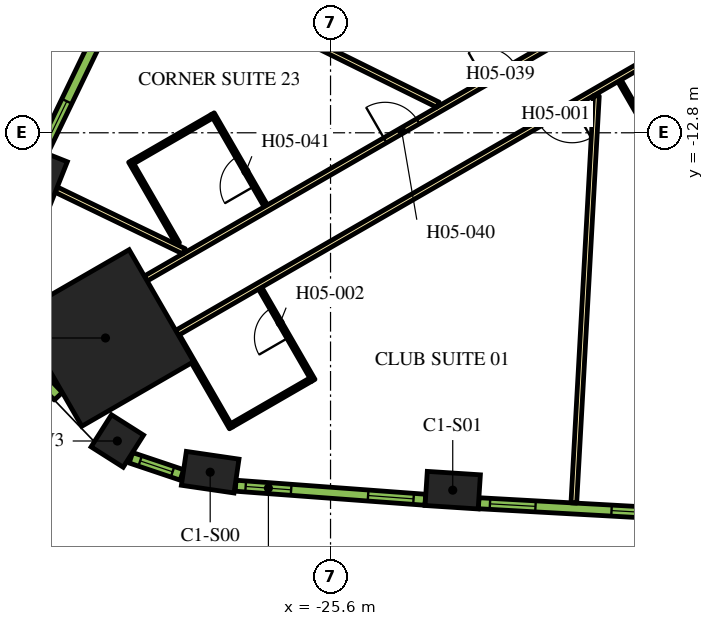
"""IFC4 building model, lengths in metres.
Left out: names, types, materials, properties, quantities, classifications, styles, units other than length and angle.
Written with IfcOpenShell. Run it as: python <this file> out.ifc"""

import sys

from ifc_helpers import new_model, si_unit, direction, frame, frame_2d, origin, origin_2d, place, context, subcontext, project, spatial, rectangle, extrude, element, fill, save


model = new_model("IFC4")
c1 = context("Model", 3, precision=1e-05, world=origin(), true_north=direction((0.0, 1.0)))
c2 = subcontext(c1, "Body", "Model", "MODEL_VIEW")
j1 = project(units=[si_unit("LENGTHUNIT", "METRE"), si_unit("PLANEANGLEUNIT", "RADIAN")], contexts=[c1])
p1 = place(None, origin())
s1 = spatial("IfcSite", under=j1, at=p1, CompositionType="ELEMENT")
p2 = place(p1, origin())
s2 = spatial("IfcBuilding", under=s1, at=p2, CompositionType="ELEMENT")
p3 = place(p2, frame((0.0, 0.0, 74.4)))
s3 = spatial("IfcBuildingStorey", under=s2, at=p3, CompositionType="ELEMENT", Elevation=74.4)
p4 = place(p3, frame((-31.522, -18.199, 0.0), z_axis=(0.0, 0.0, 1.0), x_axis=(-0.866025403784, -0.5, 0.0)))
e1 = element("IfcColumn", 1, at=p4, inside=s3, PredefinedType="COLUMN", context=c2, shape_type="SweptSolid", body=[
    extrude(rectangle(XDim=3.4, YDim=3.4, at=origin_2d()), origin(), (0.0, 0.0, 1.0), 3.9),
])
for number, where, z_axis, x_axis in (
    (2, (-28.767, -21.731, 0.0), (0.0, 0.0, 1.0), (0.989, -0.145, 0.0)),
    (3, (-22.385, -22.204, 0.0), (0.0, 0.0, 1.0), (0.998, -0.065, 0.0)),
    (4, (-33.203, -14.047, 0.0), (0.0, 0.0, 1.0), (-0.369, -0.929, 0.0)),
):
    element("IfcColumn", number, at=place(p3, frame(where, z_axis=z_axis, x_axis=x_axis)), inside=s3, PredefinedType="COLUMN", context=c2, shape_type="SweptSolid", body=[
        extrude(rectangle(XDim=1.4, YDim=0.9, at=origin_2d()), origin(), (0.0, 0.0, 1.0), 3.9),
    ])
p5 = place(p3, frame((-31.21, -20.91, 0.0), z_axis=(0.0, 0.0, 1.0), x_axis=(0.844485001826, -0.535579202071, 0.0)))
e5 = element("IfcColumn", 5, at=p5, inside=s3, PredefinedType="COLUMN", context=c2, shape_type="SweptSolid", body=[
    extrude(rectangle(XDim=1.0, YDim=1.0, at=origin_2d()), origin(), (0.0, 0.0, 1.0), 3.9),
])
p6 = place(p3, frame((-30.463, -16.635, 0.0), z_axis=(0.0, 0.0, 1.0), x_axis=(0.866022394896, 0.500005211512, 0.0)))
e6 = element("IfcWall", 6, at=p6, inside=s3, PredefinedType="PARTITIONING", context=c2, shape_type="SweptSolid", body=[
    extrude(rectangle(XDim=16.144, YDim=0.15, at=frame_2d((8.072, 0.0))), origin(), (0.0, 0.0, 1.0), 2.7),
])
p7 = place(p6, frame((13.948, 0.0, 0.0)))
e7 = element("IfcOpeningElement", 7, at=p7, cuts=e6, PredefinedType="OPENING", context=c2, shape_type="SweptSolid", body=[
    extrude(rectangle(XDim=0.9, YDim=2.1, at=frame_2d((0.45, 1.05))), frame((0.0, 0.085, 0.0), z_axis=(0.0, -1.0, 0.0), x_axis=(1.0, 0.0, 0.0)), (0.0, 0.0, 1.0), 0.17),
])
p8 = place(p6, frame((10.329, 0.0, 0.0)))
e8 = element("IfcOpeningElement", 8, at=p8, cuts=e6, PredefinedType="OPENING", context=c2, shape_type="SweptSolid", body=[
    extrude(rectangle(XDim=0.9, YDim=2.1, at=frame_2d((0.45, 1.05))), frame((0.0, 0.085, 0.0), z_axis=(0.0, -1.0, 0.0), x_axis=(1.0, 0.0, 0.0)), (0.0, 0.0, 1.0), 0.17),
])
p9 = place(p6, frame((7.275, 0.0, 0.0)))
e9 = element("IfcOpeningElement", 9, at=p9, cuts=e6, PredefinedType="OPENING", context=c2, shape_type="SweptSolid", body=[
    extrude(rectangle(XDim=1.0, YDim=2.1, at=frame_2d((0.5, 1.05))), frame((0.0, 0.085, 0.0), z_axis=(0.0, -1.0, 0.0), x_axis=(1.0, 0.0, 0.0)), (0.0, 0.0, 1.0), 0.17),
])
p10 = place(p3, frame((-15.587, -9.952, 0.0), z_axis=(0.0, 0.0, 1.0), x_axis=(-0.866022197818, -0.500005552856, 0.0)))
e10 = element("IfcWall", 10, at=p10, inside=s3, PredefinedType="PARTITIONING", context=c2, shape_type="SweptSolid", body=[
    extrude(rectangle(XDim=16.224, YDim=0.15, at=frame_2d((8.112, 0.0))), origin(), (0.0, 0.0, 1.0), 2.7),
])
p11 = place(p10, frame((4.22, 0.0, 0.0)))
e11 = element("IfcOpeningElement", 11, at=p11, cuts=e10, PredefinedType="OPENING", context=c2, shape_type="SweptSolid", body=[
    extrude(rectangle(XDim=1.0, YDim=2.1, at=frame_2d((0.5, 1.05))), frame((0.0, 0.085, 0.0), z_axis=(0.0, -1.0, 0.0), x_axis=(1.0, 0.0, 0.0)), (0.0, 0.0, 1.0), 0.17),
])
p12 = place(p3, frame((-32.817, -14.296, 0.0), z_axis=(0.0, 0.0, 1.0), x_axis=(0.900616957918, -0.434613730927, 0.0)))
e12 = element("IfcWall", 12, at=p12, inside=s3, PredefinedType="PARTITIONING", context=c2, shape_type="SweptSolid", body=[
    extrude(rectangle(XDim=3.733, YDim=0.15, at=frame_2d((1.867, 0.0))), origin(), (0.0, 0.0, 1.0), 2.7),
])
p13 = place(p3, frame((-30.018, -8.483, 0.0), z_axis=(0.0, 0.0, 1.0), x_axis=(0.896544505264, -0.44295366584, 0.0)))
e13 = element("IfcWall", 13, at=p13, inside=s3, PredefinedType="PARTITIONING", context=c2, shape_type="SweptSolid", body=[
    extrude(rectangle(XDim=8.079, YDim=0.15, at=frame_2d((4.04, 0.0))), origin(), (0.0, 0.0, 1.0), 2.7),
])
p14 = place(p3, frame((-19.198, -22.541, 0.0), z_axis=(0.0, 0.0, 1.0), x_axis=(0.055432210572, 0.99846245299, 0.0)))
e14 = element("IfcWall", 14, at=p14, inside=s3, PredefinedType="PARTITIONING", context=c2, shape_type="SweptSolid", body=[
    extrude(rectangle(XDim=10.729, YDim=0.15, at=frame_2d((5.365, 0.0))), origin(), (0.0, 0.0, 1.0), 2.7),
])
p15 = place(p3, frame((-26.052, -19.314, 0.0), z_axis=(0.0, 0.0, 1.0), x_axis=(-0.49998411664, 0.866034573852, 0.0)))
e15 = element("IfcWall", 15, at=p15, inside=s3, PredefinedType="PARTITIONING", context=c2, shape_type="SweptSolid", body=[
    extrude(rectangle(XDim=2.8, YDim=0.1, at=frame_2d((1.4, 0.0))), origin(), (0.0, 0.0, 1.0), 2.7),
])
p16 = place(p15, frame((1.3, 0.0, 0.0)))
e16 = element("IfcOpeningElement", 16, at=p16, cuts=e15, PredefinedType="OPENING", context=c2, shape_type="SweptSolid", body=[
    extrude(rectangle(XDim=0.9, YDim=2.1, at=frame_2d((0.45, 1.05))), frame((0.0, 0.06, 0.0), z_axis=(0.0, -1.0, 0.0), x_axis=(1.0, 0.0, 0.0)), (0.0, 0.0, 1.0), 0.12),
])
p17 = place(p3, frame((-26.121, -19.295, 0.0), z_axis=(0.0, 0.0, 1.0), x_axis=(-0.866006032174, -0.500033551112, 0.0)))
e17 = element("IfcWall", 17, at=p17, inside=s3, PredefinedType="PARTITIONING", context=c2, shape_type="SweptSolid", body=[
    extrude(rectangle(XDim=2.4, YDim=0.1, at=frame_2d((1.2, 0.0))), origin(), (0.0, 0.0, 1.0), 2.7),
])
p18 = place(p3, frame((-29.617, -18.139, 0.0), z_axis=(0.0, 0.0, 1.0), x_axis=(0.49998411664, -0.866034573852, 0.0)))
e18 = element("IfcWall", 18, at=p18, inside=s3, PredefinedType="PARTITIONING", context=c2, shape_type="SweptSolid", body=[
    extrude(rectangle(XDim=2.8, YDim=0.1, at=frame_2d((1.4, 0.0))), origin(), (0.0, 0.0, 1.0), 2.7),
])
p19 = place(p3, frame((-16.779, -13.538, 0.0), z_axis=(0.0, 0.0, 1.0), x_axis=(-0.500061642096, 0.865989811779, 0.0)))
e19 = element("IfcWall", 19, at=p19, inside=s3, PredefinedType="PARTITIONING", context=c2, shape_type="SweptSolid", body=[
    extrude(rectangle(XDim=2.43, YDim=0.1, at=frame_2d((1.215, 0.0))), origin(), (0.0, 0.0, 1.0), 2.7),
])
p20 = place(p3, frame((-27.304, -14.725, 0.0), z_axis=(0.0, 0.0, 1.0), x_axis=(-0.49998411664, 0.866034573852, 0.0)))
e20 = element("IfcWall", 20, at=p20, inside=s3, PredefinedType="PARTITIONING", context=c2, shape_type="SweptSolid", body=[
    extrude(rectangle(XDim=2.8, YDim=0.1, at=frame_2d((1.4, 0.0))), origin(), (0.0, 0.0, 1.0), 2.7),
])
p21 = place(p20, frame((0.6, 0.0, 0.0)))
e21 = element("IfcOpeningElement", 21, at=p21, cuts=e20, PredefinedType="OPENING", context=c2, shape_type="SweptSolid", body=[
    extrude(rectangle(XDim=0.9, YDim=2.1, at=frame_2d((0.45, 1.05))), frame((0.0, 0.06, 0.0), z_axis=(0.0, -1.0, 0.0), x_axis=(1.0, 0.0, 0.0)), (0.0, 0.0, 1.0), 0.12),
])
p22 = place(p3, frame((-28.722, -12.368, 0.0), z_axis=(0.0, 0.0, 1.0), x_axis=(-0.866050077142, -0.499957262057, 0.0)))
e22 = element("IfcWall", 22, at=p22, inside=s3, PredefinedType="PARTITIONING", context=c2, shape_type="SweptSolid", body=[
    extrude(rectangle(XDim=2.4, YDim=0.1, at=frame_2d((1.2, 0.0))), origin(), (0.0, 0.0, 1.0), 2.7),
])
p23 = place(p3, frame((-29.619, -15.715, 0.0), z_axis=(0.0, 0.0, 1.0), x_axis=(-0.500004234368, 0.866022959057, 0.0)))
e23 = element("IfcWall", 23, at=p23, inside=s3, PredefinedType="PARTITIONING", context=c2, shape_type="SweptSolid", body=[
    extrude(rectangle(XDim=2.5, YDim=0.1, at=frame_2d((1.25, 0.0))), origin(), (0.0, 0.0, 1.0), 2.7),
])
p24 = place(p3, frame((-28.098, -22.086, 0.0), z_axis=(0.0, 0.0, 1.0), x_axis=(0.997266290399, -0.073891447643, 0.0)))
e24 = element("IfcWall", 24, at=p24, inside=s3, PredefinedType="SOLIDWALL", context=c2, shape_type="SweptSolid", body=[
    extrude(rectangle(XDim=5.006, YDim=0.29, at=frame_2d((2.503, 0.0))), origin(), (0.0, 0.0, 1.0), 3.6),
])
p25 = place(p24, frame((0.265, 0.0, 0.9)))
e25 = element("IfcOpeningElement", 25, at=p25, cuts=e24, PredefinedType="OPENING", context=c2, shape_type="SweptSolid", body=[
    extrude(rectangle(XDim=1.2, YDim=2.15, at=frame_2d((0.6, 1.075))), frame((0.0, 0.155, 0.0), z_axis=(0.0, -1.0, 0.0), x_axis=(1.0, 0.0, 0.0)), (0.0, 0.0, 1.0), 0.31),
])
p26 = place(p24, frame((3.496, 0.0, 0.9)))
e26 = element("IfcOpeningElement", 26, at=p26, cuts=e24, PredefinedType="OPENING", context=c2, shape_type="SweptSolid", body=[
    extrude(rectangle(XDim=1.2, YDim=2.15, at=frame_2d((0.6, 1.075))), frame((0.0, 0.155, 0.0), z_axis=(0.0, -1.0, 0.0), x_axis=(1.0, 0.0, 0.0)), (0.0, 0.0, 1.0), 0.31),
])
p27 = place(p3, frame((-21.701, -22.547, 0.0), z_axis=(0.0, 0.0, 1.0), x_axis=(0.998464708705, -0.055391564976, 0.0)))
e27 = element("IfcWall", 27, at=p27, inside=s3, PredefinedType="SOLIDWALL", context=c2, shape_type="SweptSolid", body=[
    extrude(rectangle(XDim=4.998, YDim=0.29, at=frame_2d((2.499, 0.0))), origin(), (0.0, 0.0, 1.0), 3.6),
])
p28 = place(p27, frame((0.297, 0.0, 0.9)))
e28 = element("IfcOpeningElement", 28, at=p28, cuts=e27, PredefinedType="OPENING", context=c2, shape_type="SweptSolid", body=[
    extrude(rectangle(XDim=1.2, YDim=2.15, at=frame_2d((0.6, 1.075))), frame((0.0, 0.155, 0.0), z_axis=(0.0, -1.0, 0.0), x_axis=(1.0, 0.0, 0.0)), (0.0, 0.0, 1.0), 0.31),
])
p29 = place(p27, frame((3.501, 0.0, 0.9)))
e29 = element("IfcOpeningElement", 29, at=p29, cuts=e27, PredefinedType="OPENING", context=c2, shape_type="SweptSolid", body=[
    extrude(rectangle(XDim=1.2, YDim=2.15, at=frame_2d((0.6, 1.075))), frame((0.0, 0.155, 0.0), z_axis=(0.0, -1.0, 0.0), x_axis=(1.0, 0.0, 0.0)), (0.0, 0.0, 1.0), 0.31),
])
p30 = place(p3, frame((-31.0, -8.782, 0.0), z_axis=(0.0, 0.0, 1.0), x_axis=(-0.434664499056, -0.900592456808, 0.0)))
e30 = element("IfcWall", 30, at=p30, inside=s3, PredefinedType="SOLIDWALL", context=c2, shape_type="SweptSolid", body=[
    extrude(rectangle(XDim=5.006, YDim=0.29, at=frame_2d((2.503, 0.0))), origin(), (0.0, 0.0, 1.0), 3.6),
])
p31 = place(p30, frame((0.31, 0.0, 0.9)))
e31 = element("IfcOpeningElement", 31, at=p31, cuts=e30, PredefinedType="OPENING", context=c2, shape_type="SweptSolid", body=[
    extrude(rectangle(XDim=1.2, YDim=2.15, at=frame_2d((0.6, 1.075))), frame((0.0, 0.155, 0.0), z_axis=(0.0, -1.0, 0.0), x_axis=(1.0, 0.0, 0.0)), (0.0, 0.0, 1.0), 0.31),
])
p32 = place(p30, frame((3.541, 0.0, 0.9)))
e32 = element("IfcOpeningElement", 32, at=p32, cuts=e30, PredefinedType="OPENING", context=c2, shape_type="SweptSolid", body=[
    extrude(rectangle(XDim=1.2, YDim=2.15, at=frame_2d((0.6, 1.075))), frame((0.0, 0.155, 0.0), z_axis=(0.0, -1.0, 0.0), x_axis=(1.0, 0.0, 0.0)), (0.0, 0.0, 1.0), 0.31),
])
p33 = place(p3, frame((-33.291, -19.181, 0.0), z_axis=(0.0, 0.0, 1.0), x_axis=(0.692252359589, -0.721655506903, 0.0)))
e33 = element("IfcWall", 33, at=p33, inside=s3, PredefinedType="SOLIDWALL", context=c2, shape_type="SweptSolid", body=[
    extrude(rectangle(XDim=0.764, YDim=0.29, at=frame_2d((0.382, 0.0))), origin(), (0.0, 0.0, 1.0), 3.6),
])
p34 = place(p3, frame((-30.853, -21.352, 0.0), z_axis=(0.0, 0.0, 1.0), x_axis=(0.947903891592, -0.318556450734, 0.0)))
e34 = element("IfcWall", 34, at=p34, inside=s3, PredefinedType="SOLIDWALL", context=c2, shape_type="SweptSolid", body=[
    extrude(rectangle(XDim=1.415, YDim=0.29, at=frame_2d((0.708, 0.0))), origin(), (0.0, 0.0, 1.0), 3.6),
])
p35 = place(p34, frame((0.257, 0.0, 0.9)))
e35 = element("IfcOpeningElement", 35, at=p35, cuts=e34, PredefinedType="OPENING", context=c2, shape_type="SweptSolid", body=[
    extrude(rectangle(XDim=0.9, YDim=2.15, at=frame_2d((0.45, 1.075))), frame((0.0, 0.155, 0.0), z_axis=(0.0, -1.0, 0.0), x_axis=(1.0, 0.0, 0.0)), (0.0, 0.0, 1.0), 0.31),
])
p36 = place(p11, origin())
e36 = element("IfcDoor", 36, at=p36, inside=s3, OperationType="SINGLE_SWING_LEFT", PredefinedType="DOOR", context=c2, shape_type="SweptSolid", body=[
    extrude(rectangle(XDim=1.0, YDim=2.1, at=frame_2d((0.5, 1.05))), frame((0.0, 0.025, 0.0), z_axis=(0.0, -1.0, 0.0), x_axis=(1.0, 0.0, 0.0)), (0.0, 0.0, 1.0), 0.05),
])
fill(e11, e36)
p37 = place(p16, origin())
e37 = element("IfcDoor", 37, at=p37, inside=s3, OperationType="SINGLE_SWING_LEFT", PredefinedType="DOOR", context=c2, shape_type="SweptSolid", body=[
    extrude(rectangle(XDim=0.9, YDim=2.1, at=frame_2d((0.45, 1.05))), frame((0.0, 0.025, 0.0), z_axis=(0.0, -1.0, 0.0), x_axis=(1.0, 0.0, 0.0)), (0.0, 0.0, 1.0), 0.05),
])
fill(e16, e37)
p38 = place(p8, origin())
e38 = element("IfcDoor", 38, at=p38, inside=s3, OperationType="SINGLE_SWING_RIGHT", PredefinedType="DOOR", context=c2, shape_type="SweptSolid", body=[
    extrude(rectangle(XDim=0.9, YDim=2.1, at=frame_2d((0.45, 1.05))), frame((0.0, 0.025, 0.0), z_axis=(0.0, -1.0, 0.0), x_axis=(1.0, 0.0, 0.0)), (0.0, 0.0, 1.0), 0.05),
])
fill(e8, e38)
p39 = place(p9, origin())
e39 = element("IfcDoor", 39, at=p39, inside=s3, OperationType="SINGLE_SWING_RIGHT", PredefinedType="DOOR", context=c2, shape_type="SweptSolid", body=[
    extrude(rectangle(XDim=1.0, YDim=2.1, at=frame_2d((0.5, 1.05))), frame((0.0, 0.025, 0.0), z_axis=(0.0, -1.0, 0.0), x_axis=(1.0, 0.0, 0.0)), (0.0, 0.0, 1.0), 0.05),
])
fill(e9, e39)
p40 = place(p21, origin())
e40 = element("IfcDoor", 40, at=p40, inside=s3, OperationType="SINGLE_SWING_LEFT", PredefinedType="DOOR", context=c2, shape_type="SweptSolid", body=[
    extrude(rectangle(XDim=0.9, YDim=2.1, at=frame_2d((0.45, 1.05))), frame((0.0, 0.025, 0.0), z_axis=(0.0, -1.0, 0.0), x_axis=(1.0, 0.0, 0.0)), (0.0, 0.0, 1.0), 0.05),
])
fill(e21, e40)
p41 = place(p25, origin())
e41 = element("IfcWindow", 41, at=p41, inside=s3, PartitioningType="DOUBLE_PANEL_VERTICAL", PredefinedType="WINDOW", context=c2, shape_type="SweptSolid", body=[
    extrude(rectangle(XDim=1.2, YDim=2.15, at=frame_2d((0.6, 1.075))), frame((0.0, 0.015, 0.0), z_axis=(0.0, -1.0, 0.0), x_axis=(1.0, 0.0, 0.0)), (0.0, 0.0, 1.0), 0.06),
])
fill(e25, e41)
p42 = place(p26, origin())
e42 = element("IfcWindow", 42, at=p42, inside=s3, PartitioningType="DOUBLE_PANEL_VERTICAL", PredefinedType="WINDOW", context=c2, shape_type="SweptSolid", body=[
    extrude(rectangle(XDim=1.2, YDim=2.15, at=frame_2d((0.6, 1.075))), frame((0.0, 0.015, 0.0), z_axis=(0.0, -1.0, 0.0), x_axis=(1.0, 0.0, 0.0)), (0.0, 0.0, 1.0), 0.06),
])
fill(e26, e42)
p43 = place(p28, origin())
e43 = element("IfcWindow", 43, at=p43, inside=s3, PartitioningType="DOUBLE_PANEL_VERTICAL", PredefinedType="WINDOW", context=c2, shape_type="SweptSolid", body=[
    extrude(rectangle(XDim=1.2, YDim=2.15, at=frame_2d((0.6, 1.075))), frame((0.0, 0.015, 0.0), z_axis=(0.0, -1.0, 0.0), x_axis=(1.0, 0.0, 0.0)), (0.0, 0.0, 1.0), 0.06),
])
fill(e28, e43)
p44 = place(p29, origin())
e44 = element("IfcWindow", 44, at=p44, inside=s3, PartitioningType="DOUBLE_PANEL_VERTICAL", PredefinedType="WINDOW", context=c2, shape_type="SweptSolid", body=[
    extrude(rectangle(XDim=1.2, YDim=2.15, at=frame_2d((0.6, 1.075))), frame((0.0, 0.015, 0.0), z_axis=(0.0, -1.0, 0.0), x_axis=(1.0, 0.0, 0.0)), (0.0, 0.0, 1.0), 0.06),
])
fill(e29, e44)
p45 = place(p32, origin())
e45 = element("IfcWindow", 45, at=p45, inside=s3, PartitioningType="DOUBLE_PANEL_VERTICAL", PredefinedType="WINDOW", context=c2, shape_type="SweptSolid", body=[
    extrude(rectangle(XDim=1.2, YDim=2.15, at=frame_2d((0.6, 1.075))), frame((0.0, 0.015, 0.0), z_axis=(0.0, -1.0, 0.0), x_axis=(1.0, 0.0, 0.0)), (0.0, 0.0, 1.0), 0.06),
])
fill(e32, e45)
p46 = place(p35, origin())
e46 = element("IfcWindow", 46, at=p46, inside=s3, PartitioningType="SINGLE_PANEL", PredefinedType="WINDOW", context=c2, shape_type="SweptSolid", body=[
    extrude(rectangle(XDim=0.9, YDim=2.15, at=frame_2d((0.45, 1.075))), frame((0.0, 0.015, 0.0), z_axis=(0.0, -1.0, 0.0), x_axis=(1.0, 0.0, 0.0)), (0.0, 0.0, 1.0), 0.06),
])
fill(e35, e46)
save(model, sys.argv[1])
